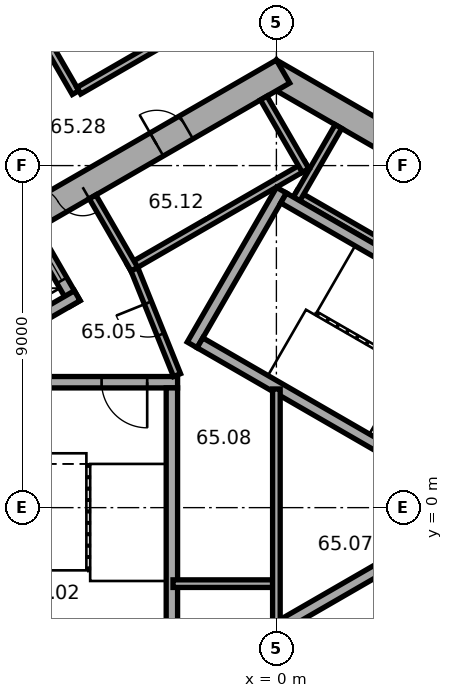
"""IFC4 building model, lengths in metres.
Left out: names, types, materials, properties, quantities, classifications, styles, units other than length and angle.
Written with IfcOpenShell. Run it as: python <this file> out.ifc"""

import sys

from ifc_helpers import new_model, si_unit, direction, frame, frame_2d, origin, place, context, subcontext, project, spatial, rectangle, extrude, element, fill, save


model = new_model("IFC4")
c1 = context("Model", 3, precision=1e-05, world=origin(), true_north=direction((0.0, 1.0)))
c2 = subcontext(c1, "Body", "Model", "MODEL_VIEW")
j1 = project(units=[si_unit("LENGTHUNIT", "METRE"), si_unit("PLANEANGLEUNIT", "RADIAN")], contexts=[c1])
p1 = place(None, origin())
s1 = spatial("IfcSite", under=j1, at=p1, CompositionType="ELEMENT")
p2 = place(p1, origin())
s2 = spatial("IfcBuilding", under=s1, at=p2, CompositionType="ELEMENT")
p3 = place(p2, frame((0.0, 0.0, 263.5)))
s3 = spatial("IfcBuildingStorey", under=s2, at=p3, CompositionType="ELEMENT", Elevation=263.5)
p4 = place(p3, frame((10.025, 5.586, 0.0), z_axis=(0.0, 0.0, 1.0), x_axis=(-0.866026453023, 0.499998182661, 0.0)))
e1 = element("IfcWall", 1, at=p4, inside=s3, PredefinedType="SHEAR", context=c2, shape_type="SweptSolid", body=[
    extrude(rectangle(XDim=11.778, YDim=0.7, at=frame_2d((5.889, 0.0))), origin(), (0.0, 0.0, 1.0), 3.7),
])
p5 = place(p4, frame((5.139, 0.0, 0.0)))
e2 = element("IfcOpeningElement", 2, at=p5, cuts=e1, PredefinedType="OPENING", context=c2, shape_type="SweptSolid", body=[
    extrude(rectangle(XDim=0.9, YDim=2.1, at=frame_2d((0.45, 1.05))), frame((0.0, 0.36, 0.0), z_axis=(0.0, -1.0, 0.0), x_axis=(1.0, 0.0, 0.0)), (0.0, 0.0, 1.0), 0.72),
])
p6 = place(p3, frame((0.175, 11.475, 0.0), z_axis=(0.0, 0.0, 1.0), x_axis=(-0.866026453023, -0.499998182661, 0.0)))
e3 = element("IfcWall", 3, at=p6, inside=s3, PredefinedType="SHEAR", context=c2, shape_type="SweptSolid", body=[
    extrude(rectangle(XDim=11.778, YDim=0.7, at=frame_2d((5.889, 0.0))), origin(), (0.0, 0.0, 1.0), 3.7),
])
p7 = place(p6, frame((6.089, 0.0, 0.0)))
e4 = element("IfcOpeningElement", 4, at=p7, cuts=e3, PredefinedType="OPENING", context=c2, shape_type="SweptSolid", body=[
    extrude(rectangle(XDim=1.5, YDim=2.1, at=frame_2d((0.75, 1.05))), frame((0.0, 0.36, 0.0), z_axis=(0.0, -1.0, 0.0), x_axis=(1.0, 0.0, 0.0)), (0.0, 0.0, 1.0), 0.72),
])
p8 = place(p6, frame((2.939, 0.0, 0.0)))
e5 = element("IfcOpeningElement", 5, at=p8, cuts=e3, PredefinedType="OPENING", context=c2, shape_type="SweptSolid", body=[
    extrude(rectangle(XDim=0.9, YDim=2.1, at=frame_2d((0.45, 1.05))), frame((0.0, 0.36, 0.0), z_axis=(0.0, -1.0, 0.0), x_axis=(1.0, 0.0, 0.0)), (0.0, 0.0, 1.0), 0.72),
])
p9 = place(p3, frame((-2.624, 20.713, 0.0), z_axis=(0.0, 0.0, 1.0), x_axis=(-0.866026460444, -0.499998169808, 0.0)))
e6 = element("IfcWall", 6, at=p9, inside=s3, PredefinedType="STANDARD", context=c2, shape_type="SweptSolid", body=[
    extrude(rectangle(XDim=17.731, YDim=0.2, at=frame_2d((8.866, 0.0))), origin(), (0.0, 0.0, 1.0), 3.7),
])
p10 = place(p9, frame((1.203, 0.0, 0.9)))
e7 = element("IfcOpeningElement", 7, at=p10, cuts=e6, PredefinedType="OPENING", context=c2, shape_type="SweptSolid", body=[
    extrude(rectangle(XDim=2.0, YDim=2.0, at=frame_2d((1.0, 1.0))), frame((0.0, 0.11, 0.0), z_axis=(0.0, -1.0, 0.0), x_axis=(1.0, 0.0, 0.0)), (0.0, 0.0, 1.0), 0.22),
])
p11 = place(p9, frame((4.535, 0.0, 0.9)))
e8 = element("IfcOpeningElement", 8, at=p11, cuts=e6, PredefinedType="OPENING", context=c2, shape_type="SweptSolid", body=[
    extrude(rectangle(XDim=2.0, YDim=2.0, at=frame_2d((1.0, 1.0))), frame((0.0, 0.11, 0.0), z_axis=(0.0, -1.0, 0.0), x_axis=(1.0, 0.0, 0.0)), (0.0, 0.0, 1.0), 0.22),
])
p12 = place(p9, frame((7.867, 0.0, 0.9)))
e9 = element("IfcOpeningElement", 9, at=p12, cuts=e6, PredefinedType="OPENING", context=c2, shape_type="SweptSolid", body=[
    extrude(rectangle(XDim=2.0, YDim=2.0, at=frame_2d((1.0, 1.0))), frame((0.0, 0.11, 0.0), z_axis=(0.0, -1.0, 0.0), x_axis=(1.0, 0.0, 0.0)), (0.0, 0.0, 1.0), 0.22),
])
p13 = place(p9, frame((11.198, 0.0, 0.9)))
e10 = element("IfcOpeningElement", 10, at=p13, cuts=e6, PredefinedType="OPENING", context=c2, shape_type="SweptSolid", body=[
    extrude(rectangle(XDim=2.0, YDim=2.0, at=frame_2d((1.0, 1.0))), frame((0.0, 0.11, 0.0), z_axis=(0.0, -1.0, 0.0), x_axis=(1.0, 0.0, 0.0)), (0.0, 0.0, 1.0), 0.22),
])
p14 = place(p9, frame((14.53, 0.0, 0.9)))
e11 = element("IfcOpeningElement", 11, at=p14, cuts=e6, PredefinedType="OPENING", context=c2, shape_type="SweptSolid", body=[
    extrude(rectangle(XDim=2.0, YDim=2.0, at=frame_2d((1.0, 1.0))), frame((0.0, 0.11, 0.0), z_axis=(0.0, -1.0, 0.0), x_axis=(1.0, 0.0, 0.0)), (0.0, 0.0, 1.0), 0.22),
])
p15 = place(p3, frame((7.424, 4.259, 0.0), z_axis=(0.0, 0.0, 1.0), x_axis=(-0.866026010844, 0.49999894854, 0.0)))
e12 = element("IfcWall", 12, at=p15, inside=s3, PredefinedType="PARTITIONING", context=c2, shape_type="SweptSolid", body=[
    extrude(rectangle(XDim=8.0, YDim=0.2, at=frame_2d((4.0, 0.0))), origin(), (0.0, 0.0, 1.0), 3.42),
])
p16 = place(p3, frame((0.532, 8.122, 0.0), z_axis=(0.0, 0.0, 1.0), x_axis=(0.500077893725, 0.86598042715, 0.0)))
e13 = element("IfcWall", 13, at=p16, inside=s3, PredefinedType="PARTITIONING", context=c2, shape_type="SweptSolid", body=[
    extrude(rectangle(XDim=2.2, YDim=0.2, at=frame_2d((1.1, 0.0))), origin(), (0.0, 0.0, 1.0), 3.42),
])
p17 = place(p3, frame((0.803, 9.009, 0.0), z_axis=(0.0, 0.0, 1.0), x_axis=(-0.866028230842, -0.499995103361, 0.0)))
e14 = element("IfcWall", 14, at=p17, inside=s3, PredefinedType="PARTITIONING", context=c2, shape_type="SweptSolid", body=[
    extrude(rectangle(XDim=5.4, YDim=0.2, at=frame_2d((2.7, 0.0))), origin(), (0.0, 0.0, 1.0), 3.42),
])
p18 = place(p3, frame((0.767, 8.872, 0.0), z_axis=(0.0, 0.0, 1.0), x_axis=(-0.499994660107, 0.866028486751, 0.0)))
e15 = element("IfcWall", 15, at=p18, inside=s3, PredefinedType="PARTITIONING", context=c2, shape_type="SweptSolid", body=[
    extrude(rectangle(XDim=2.2, YDim=0.2, at=frame_2d((1.1, 0.0))), origin(), (0.0, 0.0, 1.0), 3.42),
])
p19 = place(p3, frame((-3.737, 6.272, 0.0), z_axis=(0.0, 0.0, 1.0), x_axis=(-0.50002983664, 0.866008176907, 0.0)))
e16 = element("IfcWall", 16, at=p19, inside=s3, PredefinedType="PARTITIONING", context=c2, shape_type="SweptSolid", body=[
    extrude(rectangle(XDim=2.2, YDim=0.2, at=frame_2d((1.1, 0.0))), origin(), (0.0, 0.0, 1.0), 3.42),
])
p20 = place(p3, frame((-2.216, 4.282, 0.0), z_axis=(0.0, 0.0, 1.0), x_axis=(0.499977259774, 0.866038532462, 0.0)))
e17 = element("IfcWall", 17, at=p20, inside=s3, PredefinedType="SHEAR", context=c2, shape_type="SweptSolid", body=[
    extrude(rectangle(XDim=4.7, YDim=0.3, at=frame_2d((2.35, 0.0))), origin(), (0.0, 0.0, 1.0), 3.42),
])
for number, where, z_axis, x_axis in (
    (18, (4.103, 0.807, 0.0), (0.0, 0.0, 1.0), (-0.866, 0.5, 0.0)),
    (19, (6.303, 4.617, 0.0), (0.0, 0.0, 1.0), (-0.866, 0.5, 0.0)),
):
    element("IfcWall", number, at=place(p3, frame(where, z_axis=z_axis, x_axis=x_axis)), inside=s3, PredefinedType="SHEAR", context=c2, shape_type="SweptSolid", body=[
        extrude(rectangle(XDim=7.06, YDim=0.3, at=frame_2d((3.53, 0.0))), origin(), (0.0, 0.0, 1.0), 3.42),
    ])
p21 = place(p3, frame((-2.6, 3.3, 0.0), z_axis=(0.0, 0.0, 1.0), x_axis=(-1.0, 0.0, 0.0)))
e20 = element("IfcWall", 20, at=p21, inside=s3, PredefinedType="SHEAR", context=c2, shape_type="SweptSolid", body=[
    extrude(rectangle(XDim=4.7, YDim=0.3, at=frame_2d((2.35, 0.0))), origin(), (0.0, 0.0, 1.0), 3.42),
])
p22 = place(p21, frame((0.8, 0.0, 0.0)))
e21 = element("IfcOpeningElement", 21, at=p22, cuts=e20, PredefinedType="OPENING", context=c2, shape_type="SweptSolid", body=[
    extrude(rectangle(XDim=1.2, YDim=2.1, at=frame_2d((0.6, 1.05))), frame((0.0, 0.16, 0.0), z_axis=(0.0, -1.0, 0.0), x_axis=(1.0, 0.0, 0.0)), (0.0, 0.0, 1.0), 0.32),
])
p23 = place(p3, frame((-2.75, 3.15, 0.0), z_axis=(0.0, 0.0, 1.0), x_axis=(0.0, -1.0, 0.0)))
e22 = element("IfcWall", 22, at=p23, inside=s3, PredefinedType="SHEAR", context=c2, shape_type="SweptSolid", body=[
    extrude(rectangle(XDim=7.06, YDim=0.3, at=frame_2d((3.53, 0.0))), origin(), (0.0, 0.0, 1.0), 3.42),
])
p24 = place(p3, frame((-1.353, -3.957, 0.0), z_axis=(0.0, 0.0, 1.0), x_axis=(0.866027801685, 0.499995846692, 0.0)))
e23 = element("IfcWall", 23, at=p24, inside=s3, PredefinedType="SHEAR", context=c2, shape_type="SweptSolid", body=[
    extrude(rectangle(XDim=7.06, YDim=0.3, at=frame_2d((3.53, 0.0))), origin(), (0.0, 0.0, 1.0), 3.42),
])
p25 = place(p3, frame((-5.295, 5.372, 0.0), z_axis=(0.0, 0.0, 1.0), x_axis=(-0.500077893725, 0.86598042715, 0.0)))
e24 = element("IfcWall", 24, at=p25, inside=s3, PredefinedType="SHEAR", context=c2, shape_type="SweptSolid", body=[
    extrude(rectangle(XDim=2.2, YDim=0.3, at=frame_2d((1.1, 0.0))), origin(), (0.0, 0.0, 1.0), 3.42),
])
p26 = place(p25, frame((0.7, 0.0, 0.0)))
e25 = element("IfcOpeningElement", 25, at=p26, cuts=e24, PredefinedType="OPENING", context=c2, shape_type="SweptSolid", body=[
    extrude(rectangle(XDim=1.1, YDim=2.1, at=frame_2d((0.55, 1.05))), frame((0.0, 0.16, 0.0), z_axis=(0.0, -1.0, 0.0), x_axis=(1.0, 0.0, 0.0)), (0.0, 0.0, 1.0), 0.32),
])
p27 = place(p3, frame((-5.24, 5.577, 0.0), z_axis=(0.0, 0.0, 1.0), x_axis=(-0.866014461049, -0.500018952895, 0.0)))
e26 = element("IfcWall", 26, at=p27, inside=s3, PredefinedType="SHEAR", context=c2, shape_type="SweptSolid", body=[
    extrude(rectangle(XDim=3.35, YDim=0.3, at=frame_2d((1.675, 0.0))), origin(), (0.0, 0.0, 1.0), 3.42),
])
p28 = place(p3, frame((-2.615, 3.487, 0.0), z_axis=(0.0, 0.0, 1.0), x_axis=(-0.373576831041, 0.92759924068, 0.0)))
e27 = element("IfcWall", 27, at=p28, inside=s3, PredefinedType="PARTITIONING", context=c2, shape_type="SweptSolid", body=[
    extrude(rectangle(XDim=3.002, YDim=0.2, at=frame_2d((1.501, 0.0))), origin(), (0.0, 0.0, 1.0), 3.42),
])
p29 = place(p28, frame((1.15, 0.0, 0.0)))
e28 = element("IfcOpeningElement", 28, at=p29, cuts=e27, PredefinedType="OPENING", context=c2, shape_type="SweptSolid", body=[
    extrude(rectangle(XDim=0.9, YDim=2.1, at=frame_2d((0.45, 1.05))), frame((0.0, 0.11, 0.0), z_axis=(0.0, -1.0, 0.0), x_axis=(1.0, 0.0, 0.0)), (0.0, 0.0, 1.0), 0.22),
])
p30 = place(p3, frame((-2.72, -2.0, 0.0), z_axis=(0.0, 0.0, 1.0), x_axis=(1.0, 0.0, 0.0)))
e29 = element("IfcWall", 29, at=p30, inside=s3, PredefinedType="PARTITIONING", context=c2, shape_type="SweptSolid", body=[
    extrude(rectangle(XDim=2.62, YDim=0.2, at=frame_2d((1.31, 0.0))), origin(), (0.0, 0.0, 1.0), 3.42),
])
p31 = place(p3, frame((0.0, -3.122, 0.0), z_axis=(0.0, 0.0, 1.0), x_axis=(0.0, 1.0, 0.0)))
e30 = element("IfcWall", 30, at=p31, inside=s3, PredefinedType="PARTITIONING", context=c2, shape_type="SweptSolid", body=[
    extrude(rectangle(XDim=6.245, YDim=0.2, at=frame_2d((3.122, 0.0))), origin(), (0.0, 0.0, 1.0), 3.42),
])
p32 = place(p3, frame((-8.46, 16.42, 0.0), z_axis=(0.0, 0.0, 1.0), x_axis=(0.500005339912, -0.866022320763, 0.0)))
e31 = element("IfcWall", 31, at=p32, inside=s3, PredefinedType="PARTITIONING", context=c2, shape_type="SweptSolid", body=[
    extrude(rectangle(XDim=6.35, YDim=0.2, at=frame_2d((3.175, 0.0))), origin(), (0.0, 0.0, 1.0), 2.87),
])
p33 = place(p32, frame((2.675, 0.0, 0.0)))
e32 = element("IfcOpeningElement", 32, at=p33, cuts=e31, PredefinedType="OPENING", context=c2, shape_type="SweptSolid", body=[
    extrude(rectangle(XDim=1.0, YDim=2.1, at=frame_2d((0.5, 1.05))), frame((0.0, 0.11, 0.0), z_axis=(0.0, -1.0, 0.0), x_axis=(1.0, 0.0, 0.0)), (0.0, 0.0, 1.0), 0.22),
])
p34 = place(p3, frame((-0.95, 13.423, 0.0), z_axis=(0.0, 0.0, 1.0), x_axis=(-0.86603557629, -0.499982380289, 0.0)))
e33 = element("IfcWall", 33, at=p34, inside=s3, PredefinedType="PARTITIONING", context=c2, shape_type="SweptSolid", body=[
    extrude(rectangle(XDim=4.906, YDim=0.2, at=frame_2d((2.453, 0.0))), origin(), (0.0, 0.0, 1.0), 3.42),
])
p35 = place(p3, frame((11.15, 7.534, 0.0), z_axis=(0.0, 0.0, 1.0), x_axis=(-0.866026603062, 0.499997922785, 0.0)))
e34 = element("IfcWall", 34, at=p35, inside=s3, PredefinedType="PARTITIONING", context=c2, shape_type="SweptSolid", body=[
    extrude(rectangle(XDim=11.738, YDim=0.2, at=frame_2d((5.869, 0.0))), origin(), (0.0, 0.0, 1.0), 3.42),
])
p36 = place(p35, frame((5.345, 0.0, 0.0)))
e35 = element("IfcOpeningElement", 35, at=p36, cuts=e34, PredefinedType="OPENING", context=c2, shape_type="SweptSolid", body=[
    extrude(rectangle(XDim=1.0, YDim=2.1, at=frame_2d((0.5, 1.05))), frame((0.0, 0.11, 0.0), z_axis=(0.0, -1.0, 0.0), x_axis=(1.0, 0.0, 0.0)), (0.0, 0.0, 1.0), 0.22),
])
p37 = place(p7, origin())
e36 = element("IfcDoor", 36, at=p37, inside=s3, OperationType="DOUBLE_DOOR_SINGLE_SWING", PredefinedType="DOOR", context=c2, shape_type="SweptSolid", body=[
    extrude(rectangle(XDim=1.5, YDim=2.1, at=frame_2d((0.75, 1.05))), frame((0.0, 0.025, 0.0), z_axis=(0.0, -1.0, 0.0), x_axis=(1.0, 0.0, 0.0)), (0.0, 0.0, 1.0), 0.05),
])
fill(e4, e36)
p38 = place(p22, origin())
e37 = element("IfcDoor", 37, at=p38, inside=s3, OperationType="SINGLE_SWING_RIGHT", PredefinedType="DOOR", context=c2, shape_type="SweptSolid", body=[
    extrude(rectangle(XDim=1.2, YDim=2.1, at=frame_2d((0.6, 1.05))), frame((0.0, 0.025, 0.0), z_axis=(0.0, -1.0, 0.0), x_axis=(1.0, 0.0, 0.0)), (0.0, 0.0, 1.0), 0.05),
])
fill(e21, e37)
p39 = place(p29, origin())
e38 = element("IfcDoor", 38, at=p39, inside=s3, OperationType="SINGLE_SWING_LEFT", PredefinedType="DOOR", context=c2, shape_type="SweptSolid", body=[
    extrude(rectangle(XDim=0.9, YDim=2.1, at=frame_2d((0.45, 1.05))), frame((0.0, 0.025, 0.0), z_axis=(0.0, -1.0, 0.0), x_axis=(1.0, 0.0, 0.0)), (0.0, 0.0, 1.0), 0.05),
])
fill(e28, e38)
p40 = place(p8, origin())
e39 = element("IfcDoor", 39, at=p40, inside=s3, OperationType="SINGLE_SWING_LEFT", PredefinedType="DOOR", context=c2, shape_type="SweptSolid", body=[
    extrude(rectangle(XDim=0.9, YDim=2.1, at=frame_2d((0.45, 1.05))), frame((0.0, 0.025, 0.0), z_axis=(0.0, -1.0, 0.0), x_axis=(1.0, 0.0, 0.0)), (0.0, 0.0, 1.0), 0.05),
])
fill(e5, e39)
p41 = place(p26, origin())
e40 = element("IfcDoor", 40, at=p41, inside=s3, OperationType="DOUBLE_DOOR_SLIDING", PredefinedType="DOOR", context=c2, shape_type="SweptSolid", body=[
    extrude(rectangle(XDim=1.1, YDim=2.1, at=frame_2d((0.55, 1.05))), frame((0.0, 0.025, 0.0), z_axis=(0.0, -1.0, 0.0), x_axis=(1.0, 0.0, 0.0)), (0.0, 0.0, 1.0), 0.05),
])
fill(e25, e40)
save(model, sys.argv[1])
